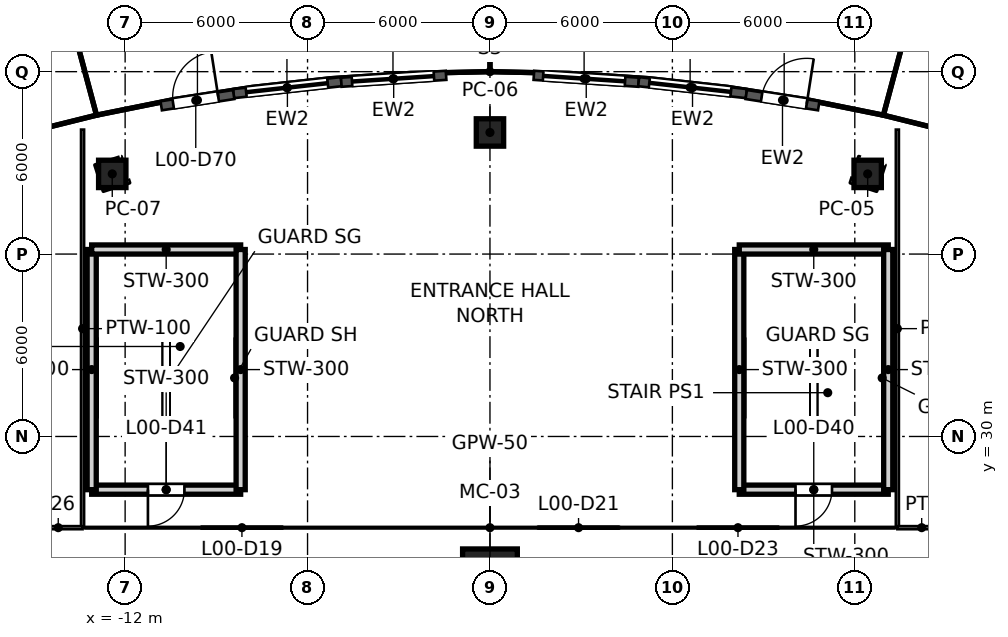
"""IFC4 building model, lengths in metres.
Left out: names, types, materials, properties, quantities, classifications, styles, units other than length and angle.
Written with IfcOpenShell. Run it as: python <this file> out.ifc"""

import sys

from ifc_helpers import new_model, si_unit, direction, frame, frame_2d, origin, origin_2d, place, context, subcontext, project, spatial, rectangle, hollow_rectangle, extrude, element, fill, save


model = new_model("IFC4")
c1 = context("Model", 3, precision=1e-05, world=origin(), true_north=direction((0.0, 1.0)))
c2 = subcontext(c1, "Body", "Model", "MODEL_VIEW")
j1 = project(units=[si_unit("LENGTHUNIT", "METRE"), si_unit("PLANEANGLEUNIT", "RADIAN")], contexts=[c1])
p1 = place(None, origin())
s1 = spatial("IfcSite", under=j1, at=p1, CompositionType="ELEMENT")
p2 = place(p1, origin())
s2 = spatial("IfcBuilding", under=s1, at=p2, CompositionType="ELEMENT")
p3 = place(p2, origin())
s3 = spatial("IfcBuildingStorey", under=s2, at=p3, CompositionType="ELEMENT", Elevation=0.0)
p4 = place(p3, frame((0.0, 25.4, 0.0), z_axis=(0.0, 0.0, 1.0), x_axis=(0.0, 1.0, 0.0)))
e1 = element("IfcColumn", 1, at=p4, inside=s3, PredefinedType="COLUMN", context=c2, shape_type="SweptSolid", body=[
    extrude(hollow_rectangle(XDim=1.8, YDim=1.8, WallThickness=0.08, at=origin_2d()), origin(), (0.0, 0.0, 1.0), 8.0),
])
for number, where, z_axis, x_axis in (
    (2, (12.423, 38.637, 0.0), (0.0, 0.0, 1.0), (0.306, 0.952, 0.0)),
    (3, (0.0, 40.0, 0.0), (0.0, 0.0, 1.0), (0.0, 1.0, 0.0)),
    (4, (-12.423, 38.637, 0.0), (0.0, 0.0, 1.0), (-0.306, 0.952, 0.0)),
):
    element("IfcColumn", number, at=place(p3, frame(where, z_axis=z_axis, x_axis=x_axis)), inside=s3, PredefinedType="COLUMN", context=c2, shape_type="SweptSolid", body=[
        extrude(hollow_rectangle(XDim=0.9, YDim=0.9, WallThickness=0.04, at=origin_2d()), origin(), (0.0, 0.0, 1.0), 8.0),
    ])
p5 = place(p3, frame((-4.891, 41.67, 0.0), z_axis=(0.0, 0.0, 1.0), x_axis=(-0.993937913469, -0.109942822269, 0.0)))
e5 = element("IfcWall", 5, at=p5, inside=s3, PredefinedType="SOLIDWALL", context=c2, shape_type="SweptSolid", body=[
    extrude(rectangle(XDim=3.564, YDim=0.3, at=frame_2d((1.782, 0.0))), origin(), (0.0, 0.0, 1.0), 7.8),
])
p6 = place(p5, frame((0.447, 0.0, 0.0)))
e6 = element("IfcOpeningElement", 6, at=p6, cuts=e5, PredefinedType="OPENING", context=c2, shape_type="SweptSolid", body=[
    extrude(rectangle(XDim=2.7, YDim=2.4, at=frame_2d((1.35, 1.2))), frame((0.0, 0.15, 0.0), z_axis=(0.0, -1.0, 0.0), x_axis=(1.0, 0.0, 0.0)), (0.0, 0.0, 1.0), 0.3),
])
p7 = place(p3, frame((-1.444, 41.88, 0.0), z_axis=(0.0, 0.0, 1.0), x_axis=(-0.997821919581, -0.065965269678, 0.0)))
e7 = element("IfcWall", 7, at=p7, inside=s3, PredefinedType="SOLIDWALL", context=c2, shape_type="SweptSolid", body=[
    extrude(rectangle(XDim=3.453, YDim=0.3, at=frame_2d((1.727, 0.0))), origin(), (0.0, 0.0, 1.0), 7.8),
])
p8 = place(p7, frame((0.4, 0.0, 0.0)))
e8 = element("IfcOpeningElement", 8, at=p8, cuts=e7, PredefinedType="OPENING", context=c2, shape_type="SweptSolid", body=[
    extrude(rectangle(XDim=2.7, YDim=2.4, at=frame_2d((1.35, 1.2))), frame((0.0, 0.15, 0.0), z_axis=(0.0, -1.0, 0.0), x_axis=(1.0, 0.0, 0.0)), (0.0, 0.0, 1.0), 0.3),
])
p9 = place(p3, frame((4.889, 41.652, 0.0), z_axis=(0.0, 0.0, 1.0), x_axis=(-0.997821919581, 0.065965269678, 0.0)))
e9 = element("IfcWall", 9, at=p9, inside=s3, PredefinedType="SOLIDWALL", context=c2, shape_type="SweptSolid", body=[
    extrude(rectangle(XDim=3.453, YDim=0.3, at=frame_2d((1.727, 0.0))), origin(), (0.0, 0.0, 1.0), 7.8),
])
p10 = place(p9, frame((0.447, 0.0, 0.0)))
e10 = element("IfcOpeningElement", 10, at=p10, cuts=e9, PredefinedType="OPENING", context=c2, shape_type="SweptSolid", body=[
    extrude(rectangle(XDim=2.7, YDim=2.4, at=frame_2d((1.35, 1.2))), frame((0.0, 0.15, 0.0), z_axis=(0.0, -1.0, 0.0), x_axis=(1.0, 0.0, 0.0)), (0.0, 0.0, 1.0), 0.3),
])
p11 = place(p3, frame((8.434, 41.278, 0.0), z_axis=(0.0, 0.0, 1.0), x_axis=(-0.993937913469, 0.109942822269, 0.0)))
e11 = element("IfcWall", 11, at=p11, inside=s3, PredefinedType="SOLIDWALL", context=c2, shape_type="SweptSolid", body=[
    extrude(rectangle(XDim=3.564, YDim=0.3, at=frame_2d((1.782, 0.0))), origin(), (0.0, 0.0, 1.0), 7.8),
])
p12 = place(p11, frame((0.511, 0.0, 0.0)))
e12 = element("IfcOpeningElement", 12, at=p12, cuts=e11, PredefinedType="OPENING", context=c2, shape_type="SweptSolid", body=[
    extrude(rectangle(XDim=2.7, YDim=2.4, at=frame_2d((1.35, 1.2))), frame((0.0, 0.15, 0.0), z_axis=(0.0, -1.0, 0.0), x_axis=(1.0, 0.0, 0.0)), (0.0, 0.0, 1.0), 0.3),
])
p13 = place(p3, frame((8.43, 41.248, 0.0), z_axis=(0.0, 0.0, 1.0), x_axis=(0.988096306645, -0.153836565205, 0.0)))
e13 = element("IfcWall", 13, at=p13, inside=s3, PredefinedType="SOLIDWALL", context=c2, shape_type="SweptSolid", body=[
    extrude(rectangle(XDim=2.412, YDim=0.3, at=frame_2d((1.206, 0.0))), origin(), (0.0, 0.0, 1.0), 7.8),
])
p14 = place(p13, frame((0.512, 0.0, 0.0)))
e14 = element("IfcOpeningElement", 14, at=p14, cuts=e13, PredefinedType="OPENING", context=c2, shape_type="SweptSolid", body=[
    extrude(rectangle(XDim=1.5, YDim=2.1, at=frame_2d((0.75, 1.05))), frame((0.0, 0.15, 0.0), z_axis=(0.0, -1.0, 0.0), x_axis=(1.0, 0.0, 0.0)), (0.0, 0.0, 1.0), 0.3),
])
p15 = place(p3, frame((-10.813, 40.877, 0.0), z_axis=(0.0, 0.0, 1.0), x_axis=(0.988096306645, 0.153836565205, 0.0)))
e15 = element("IfcWall", 15, at=p15, inside=s3, PredefinedType="SOLIDWALL", context=c2, shape_type="SweptSolid", body=[
    extrude(rectangle(XDim=2.412, YDim=0.3, at=frame_2d((1.206, 0.0))), origin(), (0.0, 0.0, 1.0), 7.8),
])
p16 = place(p15, frame((0.4, 0.0, 0.0)))
e16 = element("IfcOpeningElement", 16, at=p16, cuts=e15, PredefinedType="OPENING", context=c2, shape_type="SweptSolid", body=[
    extrude(rectangle(XDim=1.5, YDim=2.1, at=frame_2d((0.75, 1.05))), frame((0.0, 0.15, 0.0), z_axis=(0.0, -1.0, 0.0), x_axis=(1.0, 0.0, 0.0)), (0.0, 0.0, 1.0), 0.3),
])
p17 = place(p3, frame((13.1, 28.25, 0.0), z_axis=(0.0, 0.0, 1.0), x_axis=(-1.0, 0.0, 0.0)))
e17 = element("IfcWall", 17, at=p17, inside=s3, PredefinedType="SOLIDWALL", context=c2, shape_type="SweptSolid", body=[
    extrude(rectangle(XDim=4.9, YDim=0.3, at=frame_2d((2.45, 0.0))), origin(), (0.0, 0.0, 1.0), 7.8),
])
p18 = place(p17, frame((1.85, 0.0, 0.0)))
e18 = element("IfcOpeningElement", 18, at=p18, cuts=e17, PredefinedType="OPENING", context=c2, shape_type="SweptSolid", body=[
    extrude(rectangle(XDim=1.2, YDim=2.1, at=frame_2d((0.6, 1.05))), frame((0.0, 0.15, 0.0), z_axis=(0.0, -1.0, 0.0), x_axis=(1.0, 0.0, 0.0)), (0.0, 0.0, 1.0), 0.3),
])
p19 = place(p3, frame((8.2, 28.25, 0.0), z_axis=(0.0, 0.0, 1.0), x_axis=(0.0, 1.0, 0.0)))
e19 = element("IfcWall", 19, at=p19, inside=s3, PredefinedType="SOLIDWALL", context=c2, shape_type="SweptSolid", body=[
    extrude(rectangle(XDim=7.9, YDim=0.3, at=frame_2d((3.95, 0.0))), origin(), (0.0, 0.0, 1.0), 7.8),
])
p20 = place(p3, frame((8.2, 36.15, 0.0), z_axis=(0.0, 0.0, 1.0), x_axis=(1.0, 0.0, 0.0)))
e20 = element("IfcWall", 20, at=p20, inside=s3, PredefinedType="SOLIDWALL", context=c2, shape_type="SweptSolid", body=[
    extrude(rectangle(XDim=4.9, YDim=0.3, at=frame_2d((2.45, 0.0))), origin(), (0.0, 0.0, 1.0), 7.8),
])
p21 = place(p3, frame((13.1, 36.15, 0.0), z_axis=(0.0, 0.0, 1.0), x_axis=(0.0, -1.0, 0.0)))
e21 = element("IfcWall", 21, at=p21, inside=s3, PredefinedType="SOLIDWALL", context=c2, shape_type="SweptSolid", body=[
    extrude(rectangle(XDim=7.9, YDim=0.3, at=frame_2d((3.95, 0.0))), origin(), (0.0, 0.0, 1.0), 7.8),
])
p22 = place(p3, frame((-8.2, 28.25, 0.0), z_axis=(0.0, 0.0, 1.0), x_axis=(-1.0, 0.0, 0.0)))
e22 = element("IfcWall", 22, at=p22, inside=s3, PredefinedType="SOLIDWALL", context=c2, shape_type="SweptSolid", body=[
    extrude(rectangle(XDim=4.9, YDim=0.3, at=frame_2d((2.45, 0.0))), origin(), (0.0, 0.0, 1.0), 7.8),
])
p23 = place(p22, frame((1.85, 0.0, 0.0)))
e23 = element("IfcOpeningElement", 23, at=p23, cuts=e22, PredefinedType="OPENING", context=c2, shape_type="SweptSolid", body=[
    extrude(rectangle(XDim=1.2, YDim=2.1, at=frame_2d((0.6, 1.05))), frame((0.0, 0.15, 0.0), z_axis=(0.0, -1.0, 0.0), x_axis=(1.0, 0.0, 0.0)), (0.0, 0.0, 1.0), 0.3),
])
p24 = place(p3, frame((-13.1, 28.25, 0.0), z_axis=(0.0, 0.0, 1.0), x_axis=(0.0, 1.0, 0.0)))
e24 = element("IfcWall", 24, at=p24, inside=s3, PredefinedType="SOLIDWALL", context=c2, shape_type="SweptSolid", body=[
    extrude(rectangle(XDim=7.9, YDim=0.3, at=frame_2d((3.95, 0.0))), origin(), (0.0, 0.0, 1.0), 7.8),
])
p25 = place(p3, frame((-13.1, 36.15, 0.0), z_axis=(0.0, 0.0, 1.0), x_axis=(1.0, 0.0, 0.0)))
e25 = element("IfcWall", 25, at=p25, inside=s3, PredefinedType="SOLIDWALL", context=c2, shape_type="SweptSolid", body=[
    extrude(rectangle(XDim=4.9, YDim=0.3, at=frame_2d((2.45, 0.0))), origin(), (0.0, 0.0, 1.0), 7.8),
])
p26 = place(p3, frame((-8.2, 36.15, 0.0), z_axis=(0.0, 0.0, 1.0), x_axis=(0.0, -1.0, 0.0)))
e26 = element("IfcWall", 26, at=p26, inside=s3, PredefinedType="SOLIDWALL", context=c2, shape_type="SweptSolid", body=[
    extrude(rectangle(XDim=7.9, YDim=0.3, at=frame_2d((3.95, 0.0))), origin(), (0.0, 0.0, 1.0), 7.8),
])
p27 = place(p3, frame((13.4, 40.094, 0.0), z_axis=(0.0, 0.0, 1.0), x_axis=(0.0, -1.0, 0.0)))
e27 = element("IfcWall", 27, at=p27, inside=s3, PredefinedType="PARTITIONING", context=c2, shape_type="SweptSolid", body=[
    extrude(rectangle(XDim=13.094, YDim=0.1, at=frame_2d((6.547, 0.0))), origin(), (0.0, 0.0, 1.0), 6.877),
])
p28 = place(p3, frame((13.4, 27.0, 0.0), z_axis=(0.0, 0.0, 1.0), x_axis=(1.0, 0.0, 0.0)))
e28 = element("IfcWall", 28, at=p28, inside=s3, PredefinedType="PARTITIONING", context=c2, shape_type="SweptSolid", body=[
    extrude(rectangle(XDim=1.6, YDim=0.1, at=frame_2d((0.8, 0.0))), origin(), (0.0, 0.0, 1.0), 7.026),
])
p29 = place(p3, frame((-13.4, 40.094, 0.0), z_axis=(0.0, 0.0, 1.0), x_axis=(0.0, -1.0, 0.0)))
e29 = element("IfcWall", 29, at=p29, inside=s3, PredefinedType="PARTITIONING", context=c2, shape_type="SweptSolid", body=[
    extrude(rectangle(XDim=13.094, YDim=0.1, at=frame_2d((6.547, 0.0))), origin(), (0.0, 0.0, 1.0), 6.877),
])
p30 = place(p3, frame((-13.4, 27.0, 0.0), z_axis=(0.0, 0.0, 1.0), x_axis=(-1.0, 0.0, 0.0)))
e30 = element("IfcWall", 30, at=p30, inside=s3, PredefinedType="PARTITIONING", context=c2, shape_type="SweptSolid", body=[
    extrude(rectangle(XDim=1.6, YDim=0.1, at=frame_2d((0.8, 0.0))), origin(), (0.0, 0.0, 1.0), 7.026),
])
p31 = place(p3, frame((-13.304, 27.0, 0.0), z_axis=(0.0, 0.0, 1.0), x_axis=(1.0, 0.0, 0.0)))
e31 = element("IfcWall", 31, at=p31, inside=s3, PredefinedType="PARTITIONING", context=c2, shape_type="SweptSolid", body=[
    extrude(rectangle(XDim=26.608, YDim=0.05, at=frame_2d((13.304, 0.0))), origin(), (0.0, 0.0, 1.0), 7.026),
])
p32 = place(p31, frame((3.796, 0.0, 0.0)))
e32 = element("IfcOpeningElement", 32, at=p32, cuts=e31, PredefinedType="OPENING", context=c2, shape_type="SweptSolid", body=[
    extrude(rectangle(XDim=2.7, YDim=2.4, at=frame_2d((1.35, 1.2))), frame((0.0, 0.025, 0.0), z_axis=(0.0, -1.0, 0.0), x_axis=(1.0, 0.0, 0.0)), (0.0, 0.0, 1.0), 0.05),
])
p33 = place(p31, frame((14.868, 0.0, 0.0)))
e33 = element("IfcOpeningElement", 33, at=p33, cuts=e31, PredefinedType="OPENING", context=c2, shape_type="SweptSolid", body=[
    extrude(rectangle(XDim=2.7, YDim=2.4, at=frame_2d((1.35, 1.2))), frame((0.0, 0.025, 0.0), z_axis=(0.0, -1.0, 0.0), x_axis=(1.0, 0.0, 0.0)), (0.0, 0.0, 1.0), 0.05),
])
p34 = place(p31, frame((20.112, 0.0, 0.0)))
e34 = element("IfcOpeningElement", 34, at=p34, cuts=e31, PredefinedType="OPENING", context=c2, shape_type="SweptSolid", body=[
    extrude(rectangle(XDim=2.7, YDim=2.4, at=frame_2d((1.35, 1.2))), frame((0.0, 0.025, 0.0), z_axis=(0.0, -1.0, 0.0), x_axis=(1.0, 0.0, 0.0)), (0.0, 0.0, 1.0), 0.05),
])
p35 = place(p6, origin())
e35 = element("IfcDoor", 35, at=p35, inside=s3, OperationType="DOUBLE_DOOR_SLIDING", PredefinedType="DOOR", context=c2, shape_type="SweptSolid", body=[
    extrude(rectangle(XDim=2.7, YDim=2.4, at=frame_2d((1.35, 1.2))), frame((0.0, 0.025, 0.0), z_axis=(0.0, -1.0, 0.0), x_axis=(1.0, 0.0, 0.0)), (0.0, 0.0, 1.0), 0.05),
])
fill(e6, e35)
p36 = place(p8, origin())
e36 = element("IfcDoor", 36, at=p36, inside=s3, OperationType="DOUBLE_DOOR_SLIDING", PredefinedType="DOOR", context=c2, shape_type="SweptSolid", body=[
    extrude(rectangle(XDim=2.7, YDim=2.4, at=frame_2d((1.35, 1.2))), frame((0.0, 0.025, 0.0), z_axis=(0.0, -1.0, 0.0), x_axis=(1.0, 0.0, 0.0)), (0.0, 0.0, 1.0), 0.05),
])
fill(e8, e36)
p37 = place(p10, origin())
e37 = element("IfcDoor", 37, at=p37, inside=s3, OperationType="DOUBLE_DOOR_SLIDING", PredefinedType="DOOR", context=c2, shape_type="SweptSolid", body=[
    extrude(rectangle(XDim=2.7, YDim=2.4, at=frame_2d((1.35, 1.2))), frame((0.0, 0.025, 0.0), z_axis=(0.0, -1.0, 0.0), x_axis=(1.0, 0.0, 0.0)), (0.0, 0.0, 1.0), 0.05),
])
fill(e10, e37)
p38 = place(p12, origin())
e38 = element("IfcDoor", 38, at=p38, inside=s3, OperationType="DOUBLE_DOOR_SLIDING", PredefinedType="DOOR", context=c2, shape_type="SweptSolid", body=[
    extrude(rectangle(XDim=2.7, YDim=2.4, at=frame_2d((1.35, 1.2))), frame((0.0, 0.025, 0.0), z_axis=(0.0, -1.0, 0.0), x_axis=(1.0, 0.0, 0.0)), (0.0, 0.0, 1.0), 0.05),
])
fill(e12, e38)
p39 = place(p14, origin())
e39 = element("IfcDoor", 39, at=p39, inside=s3, OperationType="SINGLE_SWING_RIGHT", PredefinedType="DOOR", context=c2, shape_type="SweptSolid", body=[
    extrude(rectangle(XDim=1.5, YDim=2.1, at=frame_2d((0.75, 1.05))), frame((0.0, 0.025, 0.0), z_axis=(0.0, -1.0, 0.0), x_axis=(1.0, 0.0, 0.0)), (0.0, 0.0, 1.0), 0.05),
])
fill(e14, e39)
p40 = place(p16, origin())
e40 = element("IfcDoor", 40, at=p40, inside=s3, OperationType="SINGLE_SWING_RIGHT", PredefinedType="DOOR", context=c2, shape_type="SweptSolid", body=[
    extrude(rectangle(XDim=1.5, YDim=2.1, at=frame_2d((0.75, 1.05))), frame((0.0, 0.025, 0.0), z_axis=(0.0, -1.0, 0.0), x_axis=(1.0, 0.0, 0.0)), (0.0, 0.0, 1.0), 0.05),
])
fill(e16, e40)
p41 = place(p32, origin())
e41 = element("IfcDoor", 41, at=p41, inside=s3, OperationType="DOUBLE_DOOR_SLIDING", PredefinedType="DOOR", context=c2, shape_type="SweptSolid", body=[
    extrude(rectangle(XDim=2.7, YDim=2.4, at=frame_2d((1.35, 1.2))), frame((0.0, 0.025, 0.0), z_axis=(0.0, -1.0, 0.0), x_axis=(1.0, 0.0, 0.0)), (0.0, 0.0, 1.0), 0.05),
])
fill(e32, e41)
p42 = place(p33, origin())
e42 = element("IfcDoor", 42, at=p42, inside=s3, OperationType="DOUBLE_DOOR_SLIDING", PredefinedType="DOOR", context=c2, shape_type="SweptSolid", body=[
    extrude(rectangle(XDim=2.7, YDim=2.4, at=frame_2d((1.35, 1.2))), frame((0.0, 0.025, 0.0), z_axis=(0.0, -1.0, 0.0), x_axis=(1.0, 0.0, 0.0)), (0.0, 0.0, 1.0), 0.05),
])
fill(e33, e42)
p43 = place(p34, origin())
e43 = element("IfcDoor", 43, at=p43, inside=s3, OperationType="DOUBLE_DOOR_SLIDING", PredefinedType="DOOR", context=c2, shape_type="SweptSolid", body=[
    extrude(rectangle(XDim=2.7, YDim=2.4, at=frame_2d((1.35, 1.2))), frame((0.0, 0.025, 0.0), z_axis=(0.0, -1.0, 0.0), x_axis=(1.0, 0.0, 0.0)), (0.0, 0.0, 1.0), 0.05),
])
fill(e34, e43)
p44 = place(p18, origin())
e44 = element("IfcDoor", 44, at=p44, inside=s3, OperationType="SINGLE_SWING_RIGHT", PredefinedType="DOOR", context=c2, shape_type="SweptSolid", body=[
    extrude(rectangle(XDim=1.2, YDim=2.1, at=frame_2d((0.6, 1.05))), frame((0.0, 0.025, 0.0), z_axis=(0.0, -1.0, 0.0), x_axis=(1.0, 0.0, 0.0)), (0.0, 0.0, 1.0), 0.05),
])
fill(e18, e44)
p45 = place(p23, origin())
e45 = element("IfcDoor", 45, at=p45, inside=s3, OperationType="SINGLE_SWING_RIGHT", PredefinedType="DOOR", context=c2, shape_type="SweptSolid", body=[
    extrude(rectangle(XDim=1.2, YDim=2.1, at=frame_2d((0.6, 1.05))), frame((0.0, 0.025, 0.0), z_axis=(0.0, -1.0, 0.0), x_axis=(1.0, 0.0, 0.0)), (0.0, 0.0, 1.0), 0.05),
])
fill(e23, e45)
save(model, sys.argv[1])
